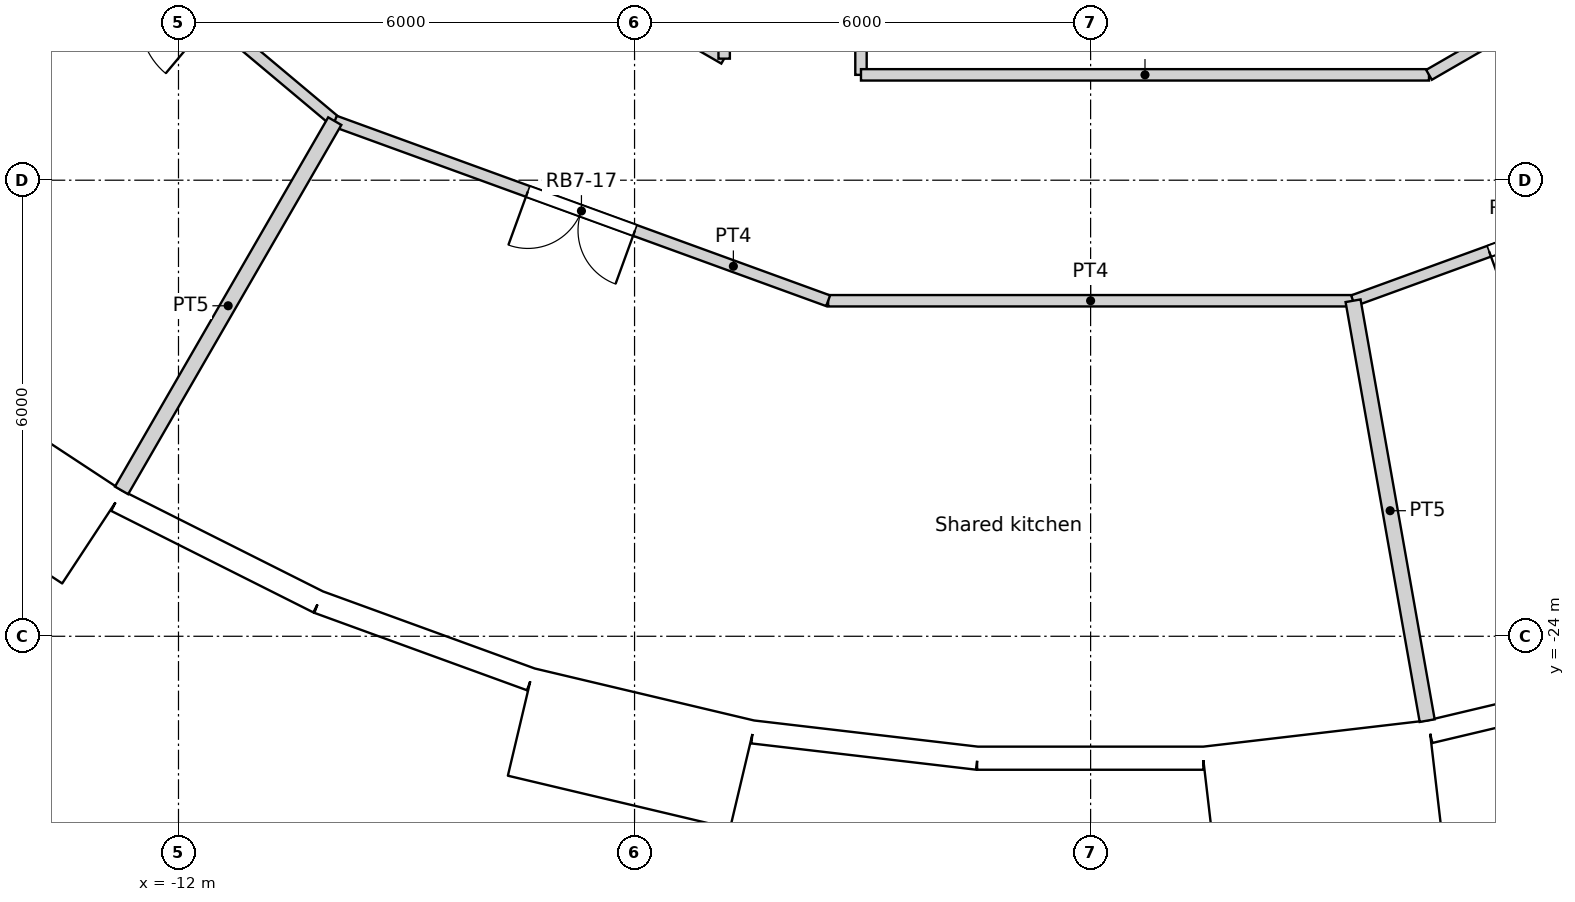
"""IFC4 building model, lengths in metres.
Left out: names, types, materials, properties, quantities, classifications, styles, units other than length and angle.
Written with IfcOpenShell. Run it as: python <this file> out.ifc"""

import sys

from ifc_helpers import new_model, si_unit, direction, frame, frame_2d, origin, origin_2d, place, context, subcontext, project, spatial, rectangle, circle, extrude, element, fill, save


model = new_model("IFC4")
c1 = context("Model", 3, precision=1e-05, world=origin(), true_north=direction((0.0, 1.0)))
c2 = subcontext(c1, "Body", "Model", "MODEL_VIEW")
j1 = project(units=[si_unit("LENGTHUNIT", "METRE"), si_unit("PLANEANGLEUNIT", "RADIAN")], contexts=[c1])
p1 = place(None, origin())
s1 = spatial("IfcSite", under=j1, at=p1, CompositionType="ELEMENT")
p2 = place(p1, origin())
s2 = spatial("IfcBuilding", under=s1, at=p2, CompositionType="ELEMENT")
p3 = place(p2, frame((0.0, 0.0, 190.8)))
s3 = spatial("IfcBuildingStorey", under=s2, at=p3, CompositionType="ELEMENT", Elevation=190.8)
for number, where, z_axis, x_axis in (
    (1, (-12.274, -21.259, 0.0), (0.0, 0.0, 1.0), (1.0, 0.0, 0.0)),
    (2, (-7.04, -23.516, 0.0), (0.0, 0.0, 1.0), (1.0, 0.0, 0.0)),
    (3, (-1.427, -24.506, 0.0), (0.0, 0.0, 1.0), (1.0, 0.0, 0.0)),
    (4, (4.263, -24.175, 0.0), (0.0, 0.0, 1.0), (1.0, 0.0, 0.0)),
):
    element("IfcColumn", number, at=place(p3, frame(where, z_axis=z_axis, x_axis=x_axis)), inside=s3, PredefinedType="COLUMN", context=c2, shape_type="SweptSolid", body=[
        extrude(circle(Radius=0.6, at=origin_2d()), origin(), (0.0, 0.0, 1.0), 3.6),
    ])
for number, where, z_axis, x_axis in (
    (5, (-9.411, -16.301, 0.0), (0.0, 0.0, 1.0), (1.0, 0.0, 0.0)),
    (6, (-4.188, -18.35, 0.0), (0.0, 0.0, 1.0), (1.0, 0.0, 0.0)),
    (7, (1.406, -18.77, 0.0), (0.0, 0.0, 1.0), (1.0, 0.0, 0.0)),
):
    element("IfcColumn", number, at=place(p3, frame(where, z_axis=z_axis, x_axis=x_axis)), inside=s3, PredefinedType="COLUMN", context=c2, shape_type="SweptSolid", body=[
        extrude(circle(Radius=0.65, at=origin_2d()), origin(), (0.0, 0.0, 1.0), 3.6),
    ])
p4 = place(p3, frame((-15.639, -21.048, -0.3), z_axis=(0.0, 0.0, 1.0), x_axis=(0.835514416706, -0.549468524554, 0.0)))
e8 = element("IfcWall", 8, at=p4, inside=s3, PredefinedType="ELEMENTEDWALL", context=c2, shape_type="SweptSolid", body=[
    extrude(rectangle(XDim=3.0, YDim=1.45, at=frame_2d((1.5, 0.0))), origin(), (0.0, 0.0, 1.0), 3.6),
])
p5 = place(p4, frame((1.5, 0.0, 1.85)))
e9 = element("IfcOpeningElement", 9, at=p5, cuts=e8, PredefinedType="OPENING", context=c2, shape_type="SweptSolid", body=[
    extrude(circle(Radius=0.9, at=origin_2d()), frame((0.0, 0.735, 0.0), z_axis=(0.0, -1.0, 0.0), x_axis=(1.0, 0.0, 0.0)), (0.0, 0.0, 1.0), 1.47),
])
p6 = place(p3, frame((-12.815, -22.216, 0.0), z_axis=(0.0, 0.0, 1.0), x_axis=(0.893637442555, -0.448789618045, 0.0)))
e10 = element("IfcWall", 10, at=p6, inside=s3, PredefinedType="SOLIDWALL", context=c2, shape_type="SweptSolid", body=[
    extrude(rectangle(XDim=2.973, YDim=0.3, at=frame_2d((1.486, 0.0))), origin(), (0.0, 0.0, 1.0), 2.8),
])
p7 = place(p6, frame((1.486, 0.0, 1.55)))
e11 = element("IfcOpeningElement", 11, at=p7, cuts=e10, PredefinedType="OPENING", context=c2, shape_type="SweptSolid", body=[
    extrude(circle(Radius=0.9, at=origin_2d()), frame((0.0, 0.16, 0.0), z_axis=(0.0, -1.0, 0.0), x_axis=(1.0, 0.0, 0.0)), (0.0, 0.0, 1.0), 0.32),
])
p8 = place(p3, frame((-10.158, -23.55, 0.0), z_axis=(0.0, 0.0, 1.0), x_axis=(0.939690282133, -0.342026568652, 0.0)))
e12 = element("IfcWall", 12, at=p8, inside=s3, PredefinedType="SOLIDWALL", context=c2, shape_type="SweptSolid", body=[
    extrude(rectangle(XDim=2.973, YDim=0.3, at=frame_2d((1.486, 0.0))), origin(), (0.0, 0.0, 1.0), 3.3),
])
p9 = place(p8, frame((1.486, 0.0, 1.55)))
e13 = element("IfcOpeningElement", 13, at=p9, cuts=e12, PredefinedType="OPENING", context=c2, shape_type="SweptSolid", body=[
    extrude(circle(Radius=0.9, at=origin_2d()), frame((0.0, 0.16, 0.0), z_axis=(0.0, -1.0, 0.0), x_axis=(1.0, 0.0, 0.0)), (0.0, 0.0, 1.0), 0.32),
])
p10 = place(p3, frame((-7.497, -25.127, -0.3), z_axis=(0.0, 0.0, 1.0), x_axis=(0.973042333261, -0.23062657627, 0.0)))
e14 = element("IfcWall", 14, at=p10, inside=s3, PredefinedType="ELEMENTEDWALL", context=c2, shape_type="SweptSolid", body=[
    extrude(rectangle(XDim=3.0, YDim=1.45, at=frame_2d((1.5, 0.0))), origin(), (0.0, 0.0, 1.0), 3.6),
])
p11 = place(p10, frame((1.5, 0.0, 1.85)))
e15 = element("IfcOpeningElement", 15, at=p11, cuts=e14, PredefinedType="OPENING", context=c2, shape_type="SweptSolid", body=[
    extrude(circle(Radius=0.9, at=origin_2d()), frame((0.0, 0.735, 0.0), z_axis=(0.0, -1.0, 0.0), x_axis=(1.0, 0.0, 0.0)), (0.0, 0.0, 1.0), 1.47),
])
p12 = place(p3, frame((-4.444, -25.259, 0.0), z_axis=(0.0, 0.0, 1.0), x_axis=(0.993245010522, -0.1160359818, 0.0)))
e16 = element("IfcWall", 16, at=p12, inside=s3, PredefinedType="SOLIDWALL", context=c2, shape_type="SweptSolid", body=[
    extrude(rectangle(XDim=2.973, YDim=0.3, at=frame_2d((1.486, 0.0))), origin(), (0.0, 0.0, 1.0), 2.8),
])
p13 = place(p12, frame((1.486, 0.0, 1.55)))
e17 = element("IfcOpeningElement", 17, at=p13, cuts=e16, PredefinedType="OPENING", context=c2, shape_type="SweptSolid", body=[
    extrude(circle(Radius=0.9, at=origin_2d()), frame((0.0, 0.16, 0.0), z_axis=(0.0, -1.0, 0.0), x_axis=(1.0, 0.0, 0.0)), (0.0, 0.0, 1.0), 0.32),
])
p14 = place(p3, frame((-1.491, -25.604, 0.0), z_axis=(0.0, 0.0, 1.0), x_axis=(1.0, 0.0, 0.0)))
e18 = element("IfcWall", 18, at=p14, inside=s3, PredefinedType="SOLIDWALL", context=c2, shape_type="SweptSolid", body=[
    extrude(rectangle(XDim=2.973, YDim=0.3, at=frame_2d((1.486, 0.0))), origin(), (0.0, 0.0, 1.0), 3.3),
])
p15 = place(p14, frame((1.486, 0.0, 1.55)))
e19 = element("IfcOpeningElement", 19, at=p15, cuts=e18, PredefinedType="OPENING", context=c2, shape_type="SweptSolid", body=[
    extrude(circle(Radius=0.9, at=origin_2d()), frame((0.0, 0.16, 0.0), z_axis=(0.0, -1.0, 0.0), x_axis=(1.0, 0.0, 0.0)), (0.0, 0.0, 1.0), 0.32),
])
p16 = place(p3, frame((1.549, -26.176, -0.3), z_axis=(0.0, 0.0, 1.0), x_axis=(0.9932342274, 0.116128246006, 0.0)))
e20 = element("IfcWall", 20, at=p16, inside=s3, PredefinedType="ELEMENTEDWALL", context=c2, shape_type="SweptSolid", body=[
    extrude(rectangle(XDim=3.0, YDim=1.45, at=frame_2d((1.5, 0.0))), origin(), (0.0, 0.0, 1.0), 3.6),
])
p17 = place(p16, frame((1.5, 0.0, 1.85)))
e21 = element("IfcOpeningElement", 21, at=p17, cuts=e20, PredefinedType="OPENING", context=c2, shape_type="SweptSolid", body=[
    extrude(circle(Radius=0.9, at=origin_2d()), frame((0.0, 0.735, 0.0), z_axis=(0.0, -1.0, 0.0), x_axis=(1.0, 0.0, 0.0)), (0.0, 0.0, 1.0), 1.47),
])
p18 = place(p3, frame((4.463, -25.256, 0.0), z_axis=(0.0, 0.0, 1.0), x_axis=(0.973045378923, 0.230613725862, 0.0)))
e22 = element("IfcWall", 22, at=p18, inside=s3, PredefinedType="SOLIDWALL", context=c2, shape_type="SweptSolid", body=[
    extrude(rectangle(XDim=2.973, YDim=0.3, at=frame_2d((1.486, 0.0))), origin(), (0.0, 0.0, 1.0), 2.8),
])
p19 = place(p18, frame((1.486, 0.0, 1.55)))
e23 = element("IfcOpeningElement", 23, at=p19, cuts=e22, PredefinedType="OPENING", context=c2, shape_type="SweptSolid", body=[
    extrude(circle(Radius=0.9, at=origin_2d()), frame((0.0, 0.16, 0.0), z_axis=(0.0, -1.0, 0.0), x_axis=(1.0, 0.0, 0.0)), (0.0, 0.0, 1.0), 0.32),
])
p20 = place(p3, frame((-15.235, -12.784, 0.0), z_axis=(0.0, 0.0, 1.0), x_axis=(0.766192104565, -0.642611592567, 0.0)))
e24 = element("IfcWall", 24, at=p20, inside=s3, PredefinedType="PARTITIONING", context=c2, shape_type="SweptSolid", body=[
    extrude(rectangle(XDim=6.906, YDim=0.15, at=frame_2d((3.453, 0.0))), origin(), (0.0, 0.0, 1.0), 3.3),
])
p21 = place(p20, frame((3.848, 0.0, 0.0)))
e25 = element("IfcOpeningElement", 25, at=p21, cuts=e24, PredefinedType="OPENING", context=c2, shape_type="SweptSolid", body=[
    extrude(rectangle(XDim=0.95, YDim=2.1, at=frame_2d((0.475, 1.05))), frame((0.0, 0.075, 0.0), z_axis=(0.0, -1.0, 0.0), x_axis=(1.0, 0.0, 0.0)), (0.0, 0.0, 1.0), 0.15),
])
p22 = place(p3, frame((-12.162, -12.162, 0.0), z_axis=(0.0, 0.0, 1.0), x_axis=(0.866004766557, -0.500035743023, 0.0)))
e26 = element("IfcWall", 26, at=p22, inside=s3, PredefinedType="PARTITIONING", context=c2, shape_type="SweptSolid", body=[
    extrude(rectangle(XDim=8.477, YDim=0.15, at=frame_2d((4.239, 0.0))), origin(), (0.0, 0.0, 1.0), 3.3),
])
p23 = place(p22, frame((3.738, 0.0, 0.0)))
e27 = element("IfcOpeningElement", 27, at=p23, cuts=e26, PredefinedType="OPENING", context=c2, shape_type="SweptSolid", body=[
    extrude(rectangle(XDim=1.0, YDim=2.04, at=frame_2d((0.5, 1.02))), frame((0.0, 0.075, 0.0), z_axis=(0.0, -1.0, 0.0), x_axis=(1.0, 0.0, 0.0)), (0.0, 0.0, 1.0), 0.15),
])
p24 = place(p3, frame((-4.821, -16.401, 0.0), z_axis=(0.0, 0.0, 1.0), x_axis=(0.0, 1.0, 0.0)))
e28 = element("IfcWall", 28, at=p24, inside=s3, PredefinedType="PARTITIONING", context=c2, shape_type="SweptSolid", body=[
    extrude(rectangle(XDim=6.101, YDim=0.15, at=frame_2d((3.05, 0.0))), origin(), (0.0, 0.0, 1.0), 3.3),
])
p25 = place(p3, frame((-3.021, -16.614, 0.0), z_axis=(0.0, 0.0, 1.0), x_axis=(0.0, 1.0, 0.0)))
e29 = element("IfcWall", 29, at=p25, inside=s3, PredefinedType="PARTITIONING", context=c2, shape_type="SweptSolid", body=[
    extrude(rectangle(XDim=6.314, YDim=0.15, at=frame_2d((3.157, 0.0))), origin(), (0.0, 0.0, 1.0), 3.3),
])
p26 = place(p3, frame((-3.021, -16.614, 0.0), z_axis=(0.0, 0.0, 1.0), x_axis=(1.0, 0.0, 0.0)))
e30 = element("IfcWall", 30, at=p26, inside=s3, PredefinedType="PARTITIONING", context=c2, shape_type="SweptSolid", body=[
    extrude(rectangle(XDim=7.473, YDim=0.15, at=frame_2d((3.736, 0.0))), origin(), (0.0, 0.0, 1.0), 3.3),
])
p27 = place(p3, frame((4.452, -16.614, 0.0), z_axis=(0.0, 0.0, 1.0), x_axis=(0.866005203721, 0.500034985904, 0.0)))
e31 = element("IfcWall", 31, at=p27, inside=s3, PredefinedType="PARTITIONING", context=c2, shape_type="SweptSolid", body=[
    extrude(rectangle(XDim=8.903, YDim=0.15, at=frame_2d((4.452, 0.0))), origin(), (0.0, 0.0, 1.0), 3.3),
])
p28 = place(p3, frame((-3.453, -19.586, 0.0), z_axis=(0.0, 0.0, 1.0), x_axis=(1.0, 0.0, 0.0)))
e32 = element("IfcWall", 32, at=p28, inside=s3, PredefinedType="PARTITIONING", context=c2, shape_type="SweptSolid", body=[
    extrude(rectangle(XDim=6.906, YDim=0.15, at=frame_2d((3.453, 0.0))), origin(), (0.0, 0.0, 1.0), 3.3),
])
p29 = place(p3, frame((-9.944, -17.223, 0.0), z_axis=(0.0, 0.0, 1.0), x_axis=(0.939672634566, -0.342075050021, 0.0)))
e33 = element("IfcWall", 33, at=p29, inside=s3, PredefinedType="PARTITIONING", context=c2, shape_type="SweptSolid", body=[
    extrude(rectangle(XDim=6.908, YDim=0.15, at=frame_2d((3.454, 0.0))), origin(), (0.0, 0.0, 1.0), 3.3),
])
p30 = place(p29, frame((2.704, 0.0, 0.0)))
e34 = element("IfcOpeningElement", 34, at=p30, cuts=e33, PredefinedType="OPENING", context=c2, shape_type="SweptSolid", body=[
    extrude(rectangle(XDim=1.5, YDim=2.1, at=frame_2d((0.75, 1.05))), frame((0.0, 0.075, 0.0), z_axis=(0.0, -1.0, 0.0), x_axis=(1.0, 0.0, 0.0)), (0.0, 0.0, 1.0), 0.15),
])
p31 = place(p3, frame((3.453, -19.586, 0.0), z_axis=(0.0, 0.0, 1.0), x_axis=(0.939672634566, 0.342075050021, 0.0)))
e35 = element("IfcWall", 35, at=p31, inside=s3, PredefinedType="PARTITIONING", context=c2, shape_type="SweptSolid", body=[
    extrude(rectangle(XDim=6.908, YDim=0.15, at=frame_2d((3.454, 0.0))), origin(), (0.0, 0.0, 1.0), 3.3),
])
p32 = place(p31, frame((1.904, 0.0, 0.0)))
e36 = element("IfcOpeningElement", 36, at=p32, cuts=e35, PredefinedType="OPENING", context=c2, shape_type="SweptSolid", body=[
    extrude(rectangle(XDim=1.0, YDim=2.04, at=frame_2d((0.5, 1.02))), frame((0.0, 0.075, 0.0), z_axis=(0.0, -1.0, 0.0), x_axis=(1.0, 0.0, 0.0)), (0.0, 0.0, 1.0), 0.15),
])
p33 = place(p3, frame((-12.749, -22.081, 0.0), z_axis=(0.0, 0.0, 1.0), x_axis=(0.500010020406, 0.866019618423, 0.0)))
e37 = element("IfcWall", 37, at=p33, inside=s3, PredefinedType="PARTITIONING", context=c2, shape_type="SweptSolid", body=[
    extrude(rectangle(XDim=5.61, YDim=0.2, at=frame_2d((2.805, 0.0))), origin(), (0.0, 0.0, 1.0), 3.3),
])
p34 = place(p3, frame((3.453, -19.586, 0.0), z_axis=(0.0, 0.0, 1.0), x_axis=(0.17382754149, -0.984776109489, 0.0)))
e38 = element("IfcWall", 38, at=p34, inside=s3, PredefinedType="PARTITIONING", context=c2, shape_type="SweptSolid", body=[
    extrude(rectangle(XDim=5.61, YDim=0.2, at=frame_2d((2.805, 0.0))), origin(), (0.0, 0.0, 1.0), 3.3),
])
p35 = place(p5, origin())
e39 = element("IfcWindow", 39, at=p35, inside=s3, PartitioningType="SINGLE_PANEL", PredefinedType="WINDOW", context=c2, shape_type="SweptSolid", body=[
    extrude(circle(Radius=0.9, at=origin_2d()), frame((0.0, 0.695, 0.0), z_axis=(0.0, -1.0, 0.0), x_axis=(1.0, 0.0, 0.0)), (0.0, 0.0, 1.0), 0.1),
])
fill(e9, e39)
p36 = place(p7, origin())
e40 = element("IfcWindow", 40, at=p36, inside=s3, PartitioningType="SINGLE_PANEL", PredefinedType="WINDOW", context=c2, shape_type="SweptSolid", body=[
    extrude(circle(Radius=0.9, at=origin_2d()), frame((0.0, 0.12, 0.0), z_axis=(0.0, -1.0, 0.0), x_axis=(1.0, 0.0, 0.0)), (0.0, 0.0, 1.0), 0.1),
])
fill(e11, e40)
p37 = place(p9, origin())
e41 = element("IfcWindow", 41, at=p37, inside=s3, PartitioningType="SINGLE_PANEL", PredefinedType="WINDOW", context=c2, shape_type="SweptSolid", body=[
    extrude(circle(Radius=0.9, at=origin_2d()), frame((0.0, 0.12, 0.0), z_axis=(0.0, -1.0, 0.0), x_axis=(1.0, 0.0, 0.0)), (0.0, 0.0, 1.0), 0.1),
])
fill(e13, e41)
p38 = place(p11, origin())
e42 = element("IfcWindow", 42, at=p38, inside=s3, PartitioningType="SINGLE_PANEL", PredefinedType="WINDOW", context=c2, shape_type="SweptSolid", body=[
    extrude(circle(Radius=0.9, at=origin_2d()), frame((0.0, 0.695, 0.0), z_axis=(0.0, -1.0, 0.0), x_axis=(1.0, 0.0, 0.0)), (0.0, 0.0, 1.0), 0.1),
])
fill(e15, e42)
p39 = place(p13, origin())
e43 = element("IfcWindow", 43, at=p39, inside=s3, PartitioningType="SINGLE_PANEL", PredefinedType="WINDOW", context=c2, shape_type="SweptSolid", body=[
    extrude(circle(Radius=0.9, at=origin_2d()), frame((0.0, 0.12, 0.0), z_axis=(0.0, -1.0, 0.0), x_axis=(1.0, 0.0, 0.0)), (0.0, 0.0, 1.0), 0.1),
])
fill(e17, e43)
p40 = place(p15, origin())
e44 = element("IfcWindow", 44, at=p40, inside=s3, PartitioningType="SINGLE_PANEL", PredefinedType="WINDOW", context=c2, shape_type="SweptSolid", body=[
    extrude(circle(Radius=0.9, at=origin_2d()), frame((0.0, 0.12, 0.0), z_axis=(0.0, -1.0, 0.0), x_axis=(1.0, 0.0, 0.0)), (0.0, 0.0, 1.0), 0.1),
])
fill(e19, e44)
p41 = place(p17, origin())
e45 = element("IfcWindow", 45, at=p41, inside=s3, PartitioningType="SINGLE_PANEL", PredefinedType="WINDOW", context=c2, shape_type="SweptSolid", body=[
    extrude(circle(Radius=0.9, at=origin_2d()), frame((0.0, 0.695, 0.0), z_axis=(0.0, -1.0, 0.0), x_axis=(1.0, 0.0, 0.0)), (0.0, 0.0, 1.0), 0.1),
])
fill(e21, e45)
p42 = place(p19, origin())
e46 = element("IfcWindow", 46, at=p42, inside=s3, PartitioningType="SINGLE_PANEL", PredefinedType="WINDOW", context=c2, shape_type="SweptSolid", body=[
    extrude(circle(Radius=0.9, at=origin_2d()), frame((0.0, 0.12, 0.0), z_axis=(0.0, -1.0, 0.0), x_axis=(1.0, 0.0, 0.0)), (0.0, 0.0, 1.0), 0.1),
])
fill(e23, e46)
p43 = place(p30, origin())
e47 = element("IfcDoor", 47, at=p43, inside=s3, OperationType="DOUBLE_DOOR_SINGLE_SWING", PredefinedType="DOOR", context=c2, shape_type="SweptSolid", body=[
    extrude(rectangle(XDim=1.5, YDim=2.1, at=frame_2d((0.75, 1.05))), frame((0.0, 0.025, 0.0), z_axis=(0.0, -1.0, 0.0), x_axis=(1.0, 0.0, 0.0)), (0.0, 0.0, 1.0), 0.05),
])
fill(e34, e47)
p44 = place(p32, origin())
e48 = element("IfcDoor", 48, at=p44, inside=s3, OperationType="SINGLE_SWING_RIGHT", PredefinedType="DOOR", context=c2, shape_type="SweptSolid", body=[
    extrude(rectangle(XDim=1.0, YDim=2.04, at=frame_2d((0.5, 1.02))), frame((0.0, 0.025, 0.0), z_axis=(0.0, -1.0, 0.0), x_axis=(1.0, 0.0, 0.0)), (0.0, 0.0, 1.0), 0.05),
])
fill(e36, e48)
save(model, sys.argv[1])
